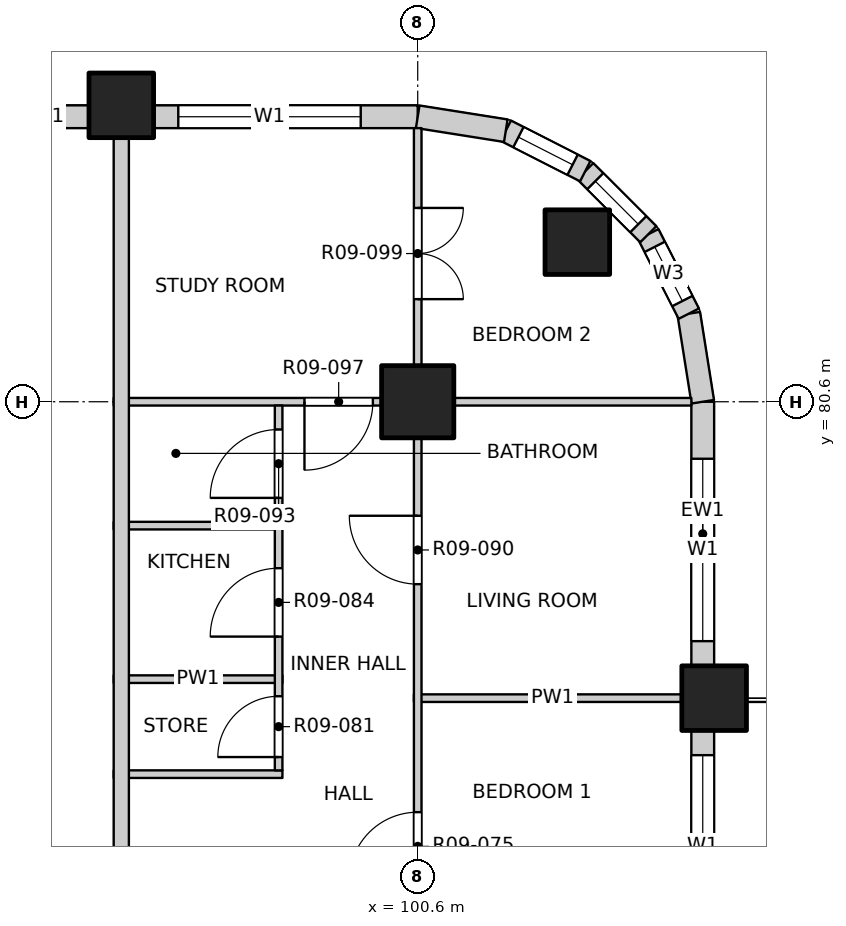
"""IFC4 building model, lengths in metres.
Left out: names, types, materials, properties, quantities, classifications, styles, units other than length and angle.
Written with IfcOpenShell. Run it as: python <this file> out.ifc"""

import sys

from ifc_helpers import new_model, si_unit, direction, frame, frame_2d, origin, origin_2d, place, context, subcontext, project, spatial, rectangle, extrude, element, fill, save


model = new_model("IFC4")
c1 = context("Model", 3, precision=1e-05, world=origin(), true_north=direction((0.0, 1.0)))
c2 = subcontext(c1, "Body", "Model", "MODEL_VIEW")
j1 = project(units=[si_unit("LENGTHUNIT", "METRE"), si_unit("PLANEANGLEUNIT", "RADIAN")], contexts=[c1])
p1 = place(None, origin())
s1 = spatial("IfcSite", under=j1, at=p1, CompositionType="ELEMENT")
p2 = place(p1, origin())
s2 = spatial("IfcBuilding", under=s1, at=p2, CompositionType="ELEMENT")
p3 = place(p2, frame((0.0, 0.0, 110.1)))
s3 = spatial("IfcBuildingStorey", under=s2, at=p3, CompositionType="ELEMENT", Elevation=110.1)
for number, where, z_axis, x_axis in (
    (1, (102.7, 82.7, -0.25), (0.0, 0.0, 1.0), (1.0, 0.0, 0.0)),
    (2, (104.5, 76.7, -0.25), (0.0, 0.0, 1.0), (1.0, 0.0, 0.0)),
    (3, (96.7, 84.5, -0.25), (0.0, 0.0, 1.0), (1.0, 0.0, 0.0)),
):
    element("IfcColumn", number, at=place(p3, frame(where, z_axis=z_axis, x_axis=x_axis)), inside=s3, PredefinedType="COLUMN", context=c2, shape_type="SweptSolid", body=[
        extrude(rectangle(XDim=0.85, YDim=0.85, at=origin_2d()), origin(), (0.0, 0.0, 1.0), 3.4),
    ])
p4 = place(p3, frame((100.6, 80.6, -0.25), z_axis=(0.0, 0.0, 1.0), x_axis=(1.0, 0.0, 0.0)))
e4 = element("IfcColumn", 4, at=p4, inside=s3, PredefinedType="COLUMN", context=c2, shape_type="SweptSolid", body=[
    extrude(rectangle(XDim=0.95, YDim=0.95, at=origin_2d()), origin(), (0.0, 0.0, 1.0), 3.4),
])
p5 = place(p3, frame((104.35, 69.325, 0.0), z_axis=(0.0, 0.0, 1.0), x_axis=(0.0, 1.0, 0.0)))
e5 = element("IfcWall", 5, at=p5, inside=s3, PredefinedType="SOLIDWALL", context=c2, shape_type="SweptSolid", body=[
    extrude(rectangle(XDim=6.95, YDim=0.3, at=frame_2d((3.475, 0.0))), origin(), (0.0, 0.0, 1.0), 2.7),
])
p6 = place(p5, frame((0.625, 0.0, 0.0)))
e6 = element("IfcOpeningElement", 6, at=p6, cuts=e5, PredefinedType="OPENING", context=c2, shape_type="SweptSolid", body=[
    extrude(rectangle(XDim=1.8, YDim=2.4, at=frame_2d((0.9, 1.2))), frame((0.0, 0.16, 0.0), z_axis=(0.0, -1.0, 0.0), x_axis=(1.0, 0.0, 0.0)), (0.0, 0.0, 1.0), 0.32),
])
p7 = place(p5, frame((4.225, 0.0, 0.9)))
e7 = element("IfcOpeningElement", 7, at=p7, cuts=e5, PredefinedType="OPENING", context=c2, shape_type="SweptSolid", body=[
    extrude(rectangle(XDim=2.4, YDim=1.8, at=frame_2d((1.2, 0.9))), frame((0.0, 0.16, 0.0), z_axis=(0.0, -1.0, 0.0), x_axis=(1.0, 0.0, 0.0)), (0.0, 0.0, 1.0), 0.32),
])
p8 = place(p3, frame((104.35, 77.125, 0.0), z_axis=(0.0, 0.0, 1.0), x_axis=(0.0, 1.0, 0.0)))
e8 = element("IfcWall", 8, at=p8, inside=s3, PredefinedType="SOLIDWALL", context=c2, shape_type="SweptSolid", body=[
    extrude(rectangle(XDim=3.475, YDim=0.3, at=frame_2d((1.738, 0.0))), origin(), (0.0, 0.0, 1.0), 2.7),
])
p9 = place(p8, frame((0.325, 0.0, 0.9)))
e9 = element("IfcOpeningElement", 9, at=p9, cuts=e8, PredefinedType="OPENING", context=c2, shape_type="SweptSolid", body=[
    extrude(rectangle(XDim=2.4, YDim=1.8, at=frame_2d((1.2, 0.9))), frame((0.0, 0.16, 0.0), z_axis=(0.0, -1.0, 0.0), x_axis=(1.0, 0.0, 0.0)), (0.0, 0.0, 1.0), 0.32),
])
p10 = place(p3, frame((95.025, 84.35, 0.0), z_axis=(0.0, 0.0, 1.0), x_axis=(1.0, 0.0, 0.0)))
e10 = element("IfcWall", 10, at=p10, inside=s3, PredefinedType="SOLIDWALL", context=c2, shape_type="SweptSolid", body=[
    extrude(rectangle(XDim=1.25, YDim=0.3, at=frame_2d((0.625, 0.0))), origin(), (0.0, 0.0, 1.0), 2.7),
])
p11 = place(p3, frame((97.125, 84.35, 0.0), z_axis=(0.0, 0.0, 1.0), x_axis=(1.0, 0.0, 0.0)))
e11 = element("IfcWall", 11, at=p11, inside=s3, PredefinedType="SOLIDWALL", context=c2, shape_type="SweptSolid", body=[
    extrude(rectangle(XDim=3.475, YDim=0.3, at=frame_2d((1.738, 0.0))), origin(), (0.0, 0.0, 1.0), 2.7),
])
p12 = place(p11, frame((0.325, 0.0, 0.9)))
e12 = element("IfcOpeningElement", 12, at=p12, cuts=e11, PredefinedType="OPENING", context=c2, shape_type="SweptSolid", body=[
    extrude(rectangle(XDim=2.4, YDim=1.8, at=frame_2d((1.2, 0.9))), frame((0.0, 0.16, 0.0), z_axis=(0.0, -1.0, 0.0), x_axis=(1.0, 0.0, 0.0)), (0.0, 0.0, 1.0), 0.32),
])
p13 = place(p3, frame((104.35, 80.6, 0.0), z_axis=(0.0, 0.0, 1.0), x_axis=(-0.156496880861, 0.987678452879, 0.0)))
e13 = element("IfcWall", 13, at=p13, inside=s3, PredefinedType="SOLIDWALL", context=c2, shape_type="SweptSolid", body=[
    extrude(rectangle(XDim=1.173, YDim=0.3, at=frame_2d((0.586, 0.0))), origin(), (0.0, 0.0, 1.0), 2.7),
])
p14 = place(p3, frame((104.167, 81.759, 0.0), z_axis=(0.0, 0.0, 1.0), x_axis=(-0.454025524128, 0.890988677504, 0.0)))
e14 = element("IfcWall", 14, at=p14, inside=s3, PredefinedType="SOLIDWALL", context=c2, shape_type="SweptSolid", body=[
    extrude(rectangle(XDim=1.173, YDim=0.3, at=frame_2d((0.587, 0.0))), origin(), (0.0, 0.0, 1.0), 2.7),
])
p15 = place(p14, frame((0.187, 0.0, 0.9)))
e15 = element("IfcOpeningElement", 15, at=p15, cuts=e14, PredefinedType="OPENING", context=c2, shape_type="SweptSolid", body=[
    extrude(rectangle(XDim=0.8, YDim=1.2, at=frame_2d((0.4, 0.6))), frame((0.0, 0.16, 0.0), z_axis=(0.0, -1.0, 0.0), x_axis=(1.0, 0.0, 0.0)), (0.0, 0.0, 1.0), 0.32),
])
p16 = place(p3, frame((103.634, 82.804, 0.0), z_axis=(0.0, 0.0, 1.0), x_axis=(-0.707106781187, 0.707106781187, 0.0)))
e16 = element("IfcWall", 16, at=p16, inside=s3, PredefinedType="SOLIDWALL", context=c2, shape_type="SweptSolid", body=[
    extrude(rectangle(XDim=1.173, YDim=0.3, at=frame_2d((0.586, 0.0))), origin(), (0.0, 0.0, 1.0), 2.7),
])
p17 = place(p16, frame((0.187, 0.0, 0.9)))
e17 = element("IfcOpeningElement", 17, at=p17, cuts=e16, PredefinedType="OPENING", context=c2, shape_type="SweptSolid", body=[
    extrude(rectangle(XDim=0.8, YDim=1.2, at=frame_2d((0.4, 0.6))), frame((0.0, 0.16, 0.0), z_axis=(0.0, -1.0, 0.0), x_axis=(1.0, 0.0, 0.0)), (0.0, 0.0, 1.0), 0.32),
])
p18 = place(p3, frame((102.804, 83.634, 0.0), z_axis=(0.0, 0.0, 1.0), x_axis=(-0.890988677504, 0.454025524128, 0.0)))
e18 = element("IfcWall", 18, at=p18, inside=s3, PredefinedType="SOLIDWALL", context=c2, shape_type="SweptSolid", body=[
    extrude(rectangle(XDim=1.173, YDim=0.3, at=frame_2d((0.587, 0.0))), origin(), (0.0, 0.0, 1.0), 2.7),
])
p19 = place(p18, frame((0.187, 0.0, 0.9)))
e19 = element("IfcOpeningElement", 19, at=p19, cuts=e18, PredefinedType="OPENING", context=c2, shape_type="SweptSolid", body=[
    extrude(rectangle(XDim=0.8, YDim=1.2, at=frame_2d((0.4, 0.6))), frame((0.0, 0.16, 0.0), z_axis=(0.0, -1.0, 0.0), x_axis=(1.0, 0.0, 0.0)), (0.0, 0.0, 1.0), 0.32),
])
p20 = place(p3, frame((101.759, 84.167, 0.0), z_axis=(0.0, 0.0, 1.0), x_axis=(-0.987678452879, 0.156496880861, 0.0)))
e20 = element("IfcWall", 20, at=p20, inside=s3, PredefinedType="SOLIDWALL", context=c2, shape_type="SweptSolid", body=[
    extrude(rectangle(XDim=1.173, YDim=0.3, at=frame_2d((0.586, 0.0))), origin(), (0.0, 0.0, 1.0), 2.7),
])
p21 = place(p3, frame((96.6, 75.7, 0.0), z_axis=(0.0, 0.0, 1.0), x_axis=(1.0, 0.0, 0.0)))
e21 = element("IfcWall", 21, at=p21, inside=s3, PredefinedType="PARTITIONING", context=c2, shape_type="SweptSolid", body=[
    extrude(rectangle(XDim=2.22, YDim=0.1, at=frame_2d((1.11, 0.0))), origin(), (0.0, 0.0, 1.0), 3.15),
])
p22 = place(p3, frame((100.55, 76.7, 0.0), z_axis=(0.0, 0.0, 1.0), x_axis=(1.0, 0.0, 0.0)))
e22 = element("IfcWall", 22, at=p22, inside=s3, PredefinedType="PARTITIONING", context=c2, shape_type="SweptSolid", body=[
    extrude(rectangle(XDim=3.65, YDim=0.1, at=frame_2d((1.825, 0.0))), origin(), (0.0, 0.0, 1.0), 2.55),
])
for number, where, z_axis, x_axis in (
    (23, (96.6, 76.95, 0.0), (0.0, 0.0, 1.0), (1.0, 0.0, 0.0)),
    (24, (96.6, 78.97, 0.0), (0.0, 0.0, 1.0), (1.0, 0.0, 0.0)),
):
    element("IfcWall", number, at=place(p3, frame(where, z_axis=z_axis, x_axis=x_axis)), inside=s3, PredefinedType="PARTITIONING", context=c2, shape_type="SweptSolid", body=[
        extrude(rectangle(XDim=2.22, YDim=0.1, at=frame_2d((1.11, 0.0))), origin(), (0.0, 0.0, 1.0), 3.15),
    ])
p23 = place(p3, frame((96.6, 80.6, 0.0), z_axis=(0.0, 0.0, 1.0), x_axis=(1.0, 0.0, 0.0)))
e25 = element("IfcWall", 25, at=p23, inside=s3, PredefinedType="PARTITIONING", context=c2, shape_type="SweptSolid", body=[
    extrude(rectangle(XDim=7.6, YDim=0.1, at=frame_2d((3.8, 0.0))), origin(), (0.0, 0.0, 1.0), 3.15),
])
p24 = place(p23, frame((2.51, 0.0, 0.0)))
e26 = element("IfcOpeningElement", 26, at=p24, cuts=e25, PredefinedType="OPENING", context=c2, shape_type="SweptSolid", body=[
    extrude(rectangle(XDim=0.9, YDim=2.1, at=frame_2d((0.45, 1.05))), frame((0.0, 0.06, 0.0), z_axis=(0.0, -1.0, 0.0), x_axis=(1.0, 0.0, 0.0)), (0.0, 0.0, 1.0), 0.12),
])
p25 = place(p3, frame((96.7, 53.4, 0.0), z_axis=(0.0, 0.0, 1.0), x_axis=(0.0, 1.0, 0.0)))
e27 = element("IfcWall", 27, at=p25, inside=s3, PredefinedType="PARTITIONING", context=c2, shape_type="SweptSolid", body=[
    extrude(rectangle(XDim=30.8, YDim=0.2, at=frame_2d((15.4, 0.0))), origin(), (0.0, 0.0, 1.0), 3.15),
])
p26 = place(p25, frame((2.875, 0.0, 0.0)))
e28 = element("IfcOpeningElement", 28, at=p26, cuts=e27, PredefinedType="OPENING", context=c2, shape_type="SweptSolid", body=[
    extrude(rectangle(XDim=1.0, YDim=2.1, at=frame_2d((0.5, 1.05))), frame((0.0, 0.11, 0.0), z_axis=(0.0, -1.0, 0.0), x_axis=(1.0, 0.0, 0.0)), (0.0, 0.0, 1.0), 0.22),
])
p27 = place(p25, frame((14.775, 0.0, 0.0)))
e29 = element("IfcOpeningElement", 29, at=p27, cuts=e27, PredefinedType="OPENING", context=c2, shape_type="SweptSolid", body=[
    extrude(rectangle(XDim=1.0, YDim=2.1, at=frame_2d((0.5, 1.05))), frame((0.0, 0.11, 0.0), z_axis=(0.0, -1.0, 0.0), x_axis=(1.0, 0.0, 0.0)), (0.0, 0.0, 1.0), 0.22),
])
p28 = place(p25, frame((20.025, 0.0, 0.0)))
e30 = element("IfcOpeningElement", 30, at=p28, cuts=e27, PredefinedType="OPENING", context=c2, shape_type="SweptSolid", body=[
    extrude(rectangle(XDim=1.0, YDim=2.1, at=frame_2d((0.5, 1.05))), frame((0.0, 0.11, 0.0), z_axis=(0.0, -1.0, 0.0), x_axis=(1.0, 0.0, 0.0)), (0.0, 0.0, 1.0), 0.22),
])
p29 = place(p3, frame((98.77, 75.75, 0.0), z_axis=(0.0, 0.0, 1.0), x_axis=(0.0, 1.0, 0.0)))
e31 = element("IfcWall", 31, at=p29, inside=s3, PredefinedType="PARTITIONING", context=c2, shape_type="SweptSolid", body=[
    extrude(rectangle(XDim=4.8, YDim=0.1, at=frame_2d((2.4, 0.0))), origin(), (0.0, 0.0, 1.0), 3.15),
])
p30 = place(p29, frame((0.175, 0.0, 0.0)))
e32 = element("IfcOpeningElement", 32, at=p30, cuts=e31, PredefinedType="OPENING", context=c2, shape_type="SweptSolid", body=[
    extrude(rectangle(XDim=0.8, YDim=2.1, at=frame_2d((0.4, 1.05))), frame((0.0, 0.06, 0.0), z_axis=(0.0, -1.0, 0.0), x_axis=(1.0, 0.0, 0.0)), (0.0, 0.0, 1.0), 0.12),
])
p31 = place(p29, frame((1.76, 0.0, 0.0)))
e33 = element("IfcOpeningElement", 33, at=p31, cuts=e31, PredefinedType="OPENING", context=c2, shape_type="SweptSolid", body=[
    extrude(rectangle(XDim=0.9, YDim=2.1, at=frame_2d((0.45, 1.05))), frame((0.0, 0.06, 0.0), z_axis=(0.0, -1.0, 0.0), x_axis=(1.0, 0.0, 0.0)), (0.0, 0.0, 1.0), 0.12),
])
p32 = place(p29, frame((3.585, 0.0, 0.0)))
e34 = element("IfcOpeningElement", 34, at=p32, cuts=e31, PredefinedType="OPENING", context=c2, shape_type="SweptSolid", body=[
    extrude(rectangle(XDim=0.9, YDim=2.1, at=frame_2d((0.45, 1.05))), frame((0.0, 0.06, 0.0), z_axis=(0.0, -1.0, 0.0), x_axis=(1.0, 0.0, 0.0)), (0.0, 0.0, 1.0), 0.12),
])
p33 = place(p3, frame((100.6, 45.8, 0.0), z_axis=(0.0, 0.0, 1.0), x_axis=(0.0, 1.0, 0.0)))
e35 = element("IfcWall", 35, at=p33, inside=s3, PredefinedType="PARTITIONING", context=c2, shape_type="SweptSolid", body=[
    extrude(rectangle(XDim=38.4, YDim=0.1, at=frame_2d((19.2, 0.0))), origin(), (0.0, 0.0, 1.0), 3.15),
])
p34 = place(p33, frame((1.05, 0.0, 0.0)))
e36 = element("IfcOpeningElement", 36, at=p34, cuts=e35, PredefinedType="OPENING", context=c2, shape_type="SweptSolid", body=[
    extrude(rectangle(XDim=1.2, YDim=2.1, at=frame_2d((0.6, 1.05))), frame((0.0, 0.06, 0.0), z_axis=(0.0, -1.0, 0.0), x_axis=(1.0, 0.0, 0.0)), (0.0, 0.0, 1.0), 0.12),
])
p35 = place(p33, frame((5.1, 0.0, 0.0)))
e37 = element("IfcOpeningElement", 37, at=p35, cuts=e35, PredefinedType="OPENING", context=c2, shape_type="SweptSolid", body=[
    extrude(rectangle(XDim=0.9, YDim=2.1, at=frame_2d((0.45, 1.05))), frame((0.0, 0.06, 0.0), z_axis=(0.0, -1.0, 0.0), x_axis=(1.0, 0.0, 0.0)), (0.0, 0.0, 1.0), 0.12),
])
p36 = place(p33, frame((9.625, 0.0, 0.0)))
e38 = element("IfcOpeningElement", 38, at=p36, cuts=e35, PredefinedType="OPENING", context=c2, shape_type="SweptSolid", body=[
    extrude(rectangle(XDim=1.2, YDim=2.1, at=frame_2d((0.6, 1.05))), frame((0.0, 0.06, 0.0), z_axis=(0.0, -1.0, 0.0), x_axis=(1.0, 0.0, 0.0)), (0.0, 0.0, 1.0), 0.12),
])
p37 = place(p33, frame((16.8, 0.0, 0.0)))
e39 = element("IfcOpeningElement", 39, at=p37, cuts=e35, PredefinedType="OPENING", context=c2, shape_type="SweptSolid", body=[
    extrude(rectangle(XDim=0.9, YDim=2.1, at=frame_2d((0.45, 1.05))), frame((0.0, 0.06, 0.0), z_axis=(0.0, -1.0, 0.0), x_axis=(1.0, 0.0, 0.0)), (0.0, 0.0, 1.0), 0.12),
])
p38 = place(p33, frame((20.7, 0.0, 0.0)))
e40 = element("IfcOpeningElement", 40, at=p38, cuts=e35, PredefinedType="OPENING", context=c2, shape_type="SweptSolid", body=[
    extrude(rectangle(XDim=0.9, YDim=2.1, at=frame_2d((0.45, 1.05))), frame((0.0, 0.06, 0.0), z_axis=(0.0, -1.0, 0.0), x_axis=(1.0, 0.0, 0.0)), (0.0, 0.0, 1.0), 0.12),
])
p39 = place(p33, frame((24.6, 0.0, 0.0)))
e41 = element("IfcOpeningElement", 41, at=p39, cuts=e35, PredefinedType="OPENING", context=c2, shape_type="SweptSolid", body=[
    extrude(rectangle(XDim=0.9, YDim=2.1, at=frame_2d((0.45, 1.05))), frame((0.0, 0.06, 0.0), z_axis=(0.0, -1.0, 0.0), x_axis=(1.0, 0.0, 0.0)), (0.0, 0.0, 1.0), 0.12),
])
p40 = place(p33, frame((28.5, 0.0, 0.0)))
e42 = element("IfcOpeningElement", 42, at=p40, cuts=e35, PredefinedType="OPENING", context=c2, shape_type="SweptSolid", body=[
    extrude(rectangle(XDim=0.9, YDim=2.1, at=frame_2d((0.45, 1.05))), frame((0.0, 0.06, 0.0), z_axis=(0.0, -1.0, 0.0), x_axis=(1.0, 0.0, 0.0)), (0.0, 0.0, 1.0), 0.12),
])
p41 = place(p33, frame((32.4, 0.0, 0.0)))
e43 = element("IfcOpeningElement", 43, at=p41, cuts=e35, PredefinedType="OPENING", context=c2, shape_type="SweptSolid", body=[
    extrude(rectangle(XDim=0.9, YDim=2.1, at=frame_2d((0.45, 1.05))), frame((0.0, 0.06, 0.0), z_axis=(0.0, -1.0, 0.0), x_axis=(1.0, 0.0, 0.0)), (0.0, 0.0, 1.0), 0.12),
])
p42 = place(p33, frame((36.15, 0.0, 0.0)))
e44 = element("IfcOpeningElement", 44, at=p42, cuts=e35, PredefinedType="OPENING", context=c2, shape_type="SweptSolid", body=[
    extrude(rectangle(XDim=1.2, YDim=2.1, at=frame_2d((0.6, 1.05))), frame((0.0, 0.06, 0.0), z_axis=(0.0, -1.0, 0.0), x_axis=(1.0, 0.0, 0.0)), (0.0, 0.0, 1.0), 0.12),
])
p43 = place(p7, origin())
e45 = element("IfcWindow", 45, at=p43, inside=s3, PartitioningType="DOUBLE_PANEL_VERTICAL", PredefinedType="WINDOW", context=c2, shape_type="SweptSolid", body=[
    extrude(rectangle(XDim=2.4, YDim=1.8, at=frame_2d((1.2, 0.9))), frame((0.0, 0.03, 0.0), z_axis=(0.0, -1.0, 0.0), x_axis=(1.0, 0.0, 0.0)), (0.0, 0.0, 1.0), 0.06),
])
fill(e7, e45)
p44 = place(p9, origin())
e46 = element("IfcWindow", 46, at=p44, inside=s3, PartitioningType="DOUBLE_PANEL_VERTICAL", PredefinedType="WINDOW", context=c2, shape_type="SweptSolid", body=[
    extrude(rectangle(XDim=2.4, YDim=1.8, at=frame_2d((1.2, 0.9))), frame((0.0, 0.03, 0.0), z_axis=(0.0, -1.0, 0.0), x_axis=(1.0, 0.0, 0.0)), (0.0, 0.0, 1.0), 0.06),
])
fill(e9, e46)
p45 = place(p12, origin())
e47 = element("IfcWindow", 47, at=p45, inside=s3, PartitioningType="DOUBLE_PANEL_VERTICAL", PredefinedType="WINDOW", context=c2, shape_type="SweptSolid", body=[
    extrude(rectangle(XDim=2.4, YDim=1.8, at=frame_2d((1.2, 0.9))), frame((0.0, 0.03, 0.0), z_axis=(0.0, -1.0, 0.0), x_axis=(1.0, 0.0, 0.0)), (0.0, 0.0, 1.0), 0.06),
])
fill(e12, e47)
p46 = place(p15, origin())
e48 = element("IfcWindow", 48, at=p46, inside=s3, PartitioningType="SINGLE_PANEL", PredefinedType="WINDOW", context=c2, shape_type="SweptSolid", body=[
    extrude(rectangle(XDim=0.8, YDim=1.2, at=frame_2d((0.4, 0.6))), frame((0.0, 0.03, 0.0), z_axis=(0.0, -1.0, 0.0), x_axis=(1.0, 0.0, 0.0)), (0.0, 0.0, 1.0), 0.06),
])
fill(e15, e48)
p47 = place(p17, origin())
e49 = element("IfcWindow", 49, at=p47, inside=s3, PartitioningType="SINGLE_PANEL", PredefinedType="WINDOW", context=c2, shape_type="SweptSolid", body=[
    extrude(rectangle(XDim=0.8, YDim=1.2, at=frame_2d((0.4, 0.6))), frame((0.0, 0.03, 0.0), z_axis=(0.0, -1.0, 0.0), x_axis=(1.0, 0.0, 0.0)), (0.0, 0.0, 1.0), 0.06),
])
fill(e17, e49)
p48 = place(p19, origin())
e50 = element("IfcWindow", 50, at=p48, inside=s3, PartitioningType="SINGLE_PANEL", PredefinedType="WINDOW", context=c2, shape_type="SweptSolid", body=[
    extrude(rectangle(XDim=0.8, YDim=1.2, at=frame_2d((0.4, 0.6))), frame((0.0, 0.03, 0.0), z_axis=(0.0, -1.0, 0.0), x_axis=(1.0, 0.0, 0.0)), (0.0, 0.0, 1.0), 0.06),
])
fill(e19, e50)
p49 = place(p40, origin())
e51 = element("IfcDoor", 51, at=p49, inside=s3, OperationType="SINGLE_SWING_LEFT", PredefinedType="DOOR", context=c2, shape_type="SweptSolid", body=[
    extrude(rectangle(XDim=0.9, YDim=2.1, at=frame_2d((0.45, 1.05))), frame((0.0, 0.025, 0.0), z_axis=(0.0, -1.0, 0.0), x_axis=(1.0, 0.0, 0.0)), (0.0, 0.0, 1.0), 0.05),
])
fill(e42, e51)
p50 = place(p30, origin())
e52 = element("IfcDoor", 52, at=p50, inside=s3, OperationType="SINGLE_SWING_LEFT", PredefinedType="DOOR", context=c2, shape_type="SweptSolid", body=[
    extrude(rectangle(XDim=0.8, YDim=2.1, at=frame_2d((0.4, 1.05))), frame((0.0, 0.025, 0.0), z_axis=(0.0, -1.0, 0.0), x_axis=(1.0, 0.0, 0.0)), (0.0, 0.0, 1.0), 0.05),
])
fill(e32, e52)
p51 = place(p31, origin())
e53 = element("IfcDoor", 53, at=p51, inside=s3, OperationType="SINGLE_SWING_LEFT", PredefinedType="DOOR", context=c2, shape_type="SweptSolid", body=[
    extrude(rectangle(XDim=0.9, YDim=2.1, at=frame_2d((0.45, 1.05))), frame((0.0, 0.025, 0.0), z_axis=(0.0, -1.0, 0.0), x_axis=(1.0, 0.0, 0.0)), (0.0, 0.0, 1.0), 0.05),
])
fill(e33, e53)
p52 = place(p41, origin())
e54 = element("IfcDoor", 54, at=p52, inside=s3, OperationType="SINGLE_SWING_RIGHT", PredefinedType="DOOR", context=c2, shape_type="SweptSolid", body=[
    extrude(rectangle(XDim=0.9, YDim=2.1, at=frame_2d((0.45, 1.05))), frame((0.0, 0.025, 0.0), z_axis=(0.0, -1.0, 0.0), x_axis=(1.0, 0.0, 0.0)), (0.0, 0.0, 1.0), 0.05),
])
fill(e43, e54)
p53 = place(p32, origin())
e55 = element("IfcDoor", 55, at=p53, inside=s3, OperationType="SINGLE_SWING_LEFT", PredefinedType="DOOR", context=c2, shape_type="SweptSolid", body=[
    extrude(rectangle(XDim=0.9, YDim=2.1, at=frame_2d((0.45, 1.05))), frame((0.0, 0.025, 0.0), z_axis=(0.0, -1.0, 0.0), x_axis=(1.0, 0.0, 0.0)), (0.0, 0.0, 1.0), 0.05),
])
fill(e34, e55)
p54 = place(p24, origin())
e56 = element("IfcDoor", 56, at=p54, inside=s3, OperationType="SINGLE_SWING_RIGHT", PredefinedType="DOOR", context=c2, shape_type="SweptSolid", body=[
    extrude(rectangle(XDim=0.9, YDim=2.1, at=frame_2d((0.45, 1.05))), frame((0.0, 0.025, 0.0), z_axis=(0.0, -1.0, 0.0), x_axis=(1.0, 0.0, 0.0)), (0.0, 0.0, 1.0), 0.05),
])
fill(e26, e56)
p55 = place(p42, origin())
e57 = element("IfcDoor", 57, at=p55, inside=s3, OperationType="DOUBLE_DOOR_SINGLE_SWING", PredefinedType="DOOR", context=c2, shape_type="SweptSolid", body=[
    extrude(rectangle(XDim=1.2, YDim=2.1, at=frame_2d((0.6, 1.05))), frame((0.0, 0.025, 0.0), z_axis=(0.0, -1.0, 0.0), x_axis=(1.0, 0.0, 0.0)), (0.0, 0.0, 1.0), 0.05),
])
fill(e44, e57)
save(model, sys.argv[1])
